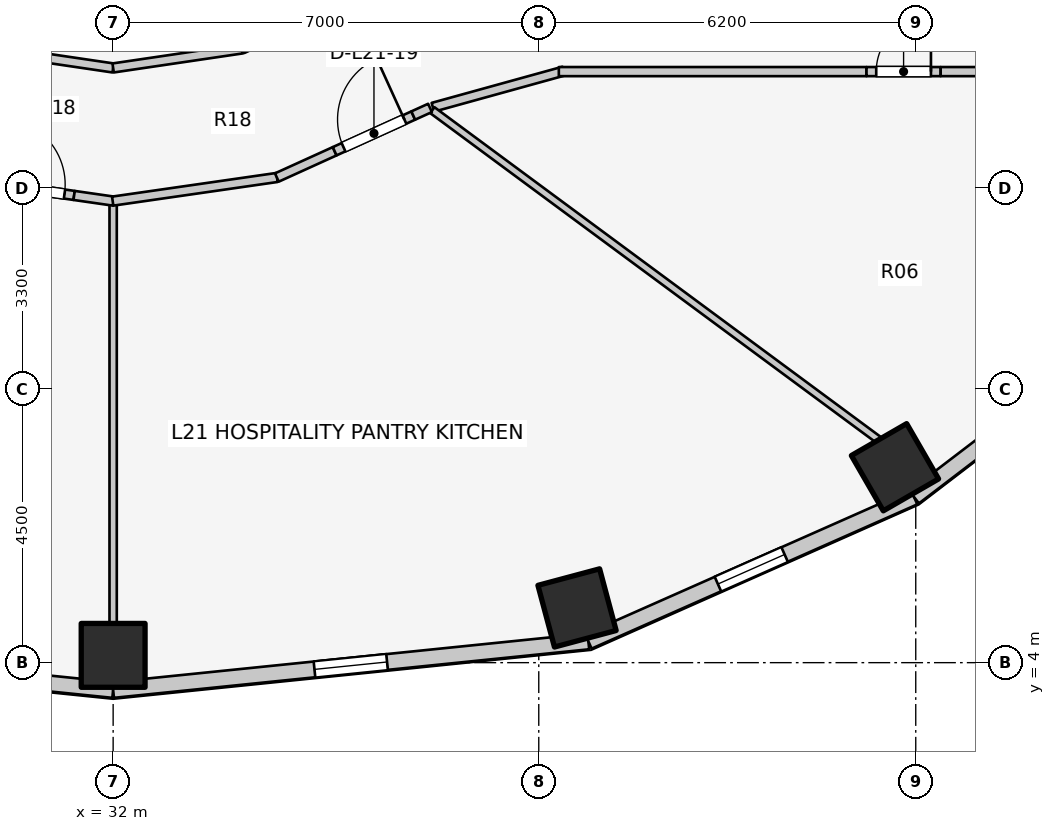
"""IFC4 building model, lengths in metres.
Left out: names, types, materials, properties, quantities, classifications, styles, units other than length and angle.
Written with IfcOpenShell. Run it as: python <this file> out.ifc"""

import sys

from ifc_helpers import new_model, si_unit, direction, frame, frame_2d, origin, origin_2d, place, context, subcontext, project, spatial, rectangle, extrude, element, fill, save


model = new_model("IFC4")
c1 = context("Model", 3, precision=1e-05, world=origin(), true_north=direction((0.0, 1.0)))
c2 = subcontext(c1, "Body", "Model", "MODEL_VIEW")
j1 = project(units=[si_unit("LENGTHUNIT", "METRE"), si_unit("PLANEANGLEUNIT", "RADIAN")], contexts=[c1])
p1 = place(None, origin())
s1 = spatial("IfcSite", under=j1, at=p1, CompositionType="ELEMENT")
p2 = place(p1, origin())
s2 = spatial("IfcBuilding", under=s1, at=p2, CompositionType="ELEMENT")
p3 = place(p2, frame((0.0, 0.0, 73.2)))
s3 = spatial("IfcBuildingStorey", under=s2, at=p3, CompositionType="ELEMENT", Elevation=73.2)
for number, where, z_axis, x_axis in (
    (1, (32.0, 4.12, 0.0), (0.0, 0.0, 1.0), (0.0, -1.0, 0.0)),
    (2, (39.629, 4.9, 0.0), (0.0, 0.0, 1.0), (0.259, -0.966, 0.0)),
    (3, (44.858, 7.214, 0.0), (0.0, 0.0, 1.0), (0.5, -0.866, 0.0)),
):
    element("IfcColumn", number, at=place(p3, frame(where, z_axis=z_axis, x_axis=x_axis)), inside=s3, PredefinedType="COLUMN", context=c2, shape_type="SweptSolid", body=[
        extrude(rectangle(XDim=1.05, YDim=1.05, at=origin_2d()), origin(), (0.0, 0.0, 1.0), 3.1),
    ])
p4 = place(p3, frame((24.184, 4.349, 0.0), z_axis=(0.0, 0.0, 1.0), x_axis=(0.994821390558, -0.101638579726, 0.0)))
e4 = element("IfcWall", 4, at=p4, inside=s3, PredefinedType="STANDARD", context=c2, shape_type="SweptSolid", body=[
    extrude(rectangle(XDim=7.857, YDim=0.26, at=frame_2d((3.929, 0.0))), origin(), (0.0, 0.0, 1.0), 1.22),
])
p5 = place(p4, frame((3.329, 0.0, 0.15)))
e5 = element("IfcOpeningElement", 5, at=p5, cuts=e4, PredefinedType="OPENING", context=c2, shape_type="SweptSolid", body=[
    extrude(rectangle(XDim=1.2, YDim=0.9, at=frame_2d((0.6, 0.45))), frame((0.0, 0.14, 0.0), z_axis=(0.0, -1.0, 0.0), x_axis=(1.0, 0.0, 0.0)), (0.0, 0.0, 1.0), 0.28),
])
p6 = place(p3, frame((32.0, 3.551, 0.0), z_axis=(0.0, 0.0, 1.0), x_axis=(0.994821390558, 0.101638579726, 0.0)))
e6 = element("IfcWall", 6, at=p6, inside=s3, PredefinedType="STANDARD", context=c2, shape_type="SweptSolid", body=[
    extrude(rectangle(XDim=7.857, YDim=0.26, at=frame_2d((3.929, 0.0))), origin(), (0.0, 0.0, 1.0), 1.22),
])
p7 = place(p6, frame((3.329, 0.0, 0.15)))
e7 = element("IfcOpeningElement", 7, at=p7, cuts=e6, PredefinedType="OPENING", context=c2, shape_type="SweptSolid", body=[
    extrude(rectangle(XDim=1.2, YDim=0.9, at=frame_2d((0.6, 0.45))), frame((0.0, 0.14, 0.0), z_axis=(0.0, -1.0, 0.0), x_axis=(1.0, 0.0, 0.0)), (0.0, 0.0, 1.0), 0.28),
])
p8 = place(p3, frame((39.816, 4.349, 0.0), z_axis=(0.0, 0.0, 1.0), x_axis=(0.914336605747, 0.404955023911, 0.0)))
e8 = element("IfcWall", 8, at=p8, inside=s3, PredefinedType="STANDARD", context=c2, shape_type="SweptSolid", body=[
    extrude(rectangle(XDim=5.859, YDim=0.26, at=frame_2d((2.929, 0.0))), origin(), (0.0, 0.0, 1.0), 1.22),
])
p9 = place(p8, frame((2.329, 0.0, 0.15)))
e9 = element("IfcOpeningElement", 9, at=p9, cuts=e8, PredefinedType="OPENING", context=c2, shape_type="SweptSolid", body=[
    extrude(rectangle(XDim=1.2, YDim=0.9, at=frame_2d((0.6, 0.45))), frame((0.0, 0.14, 0.0), z_axis=(0.0, -1.0, 0.0), x_axis=(1.0, 0.0, 0.0)), (0.0, 0.0, 1.0), 0.28),
])
p10 = place(p3, frame((45.173, 6.722, 0.0), z_axis=(0.0, 0.0, 1.0), x_axis=(0.794809810864, 0.606858603427, 0.0)))
e10 = element("IfcWall", 10, at=p10, inside=s3, PredefinedType="STANDARD", context=c2, shape_type="SweptSolid", body=[
    extrude(rectangle(XDim=5.149, YDim=0.26, at=frame_2d((2.575, 0.0))), origin(), (0.0, 0.0, 1.0), 1.22),
])
for number, where, z_axis, x_axis in (
    (11, (29.873, 14.094, 0.0), (0.0, 0.0, 1.0), (0.989, -0.146, 0.0)),
    (12, (32.0, 13.78, 0.0), (0.0, 0.0, 1.0), (0.989, 0.146, 0.0)),
):
    element("IfcWall", number, at=place(p3, frame(where, z_axis=z_axis, x_axis=x_axis)), inside=s3, PredefinedType="PARTITIONING", context=c2, shape_type="SweptSolid", body=[
        extrude(rectangle(XDim=2.151, YDim=0.15, at=frame_2d((1.075, 0.0))), origin(), (0.0, 0.0, 1.0), 1.22),
    ])
p11 = place(p3, frame((34.127, 14.094, 0.0), z_axis=(0.0, 0.0, 1.0), x_axis=(0.906943449489, 0.421252393975, 0.0)))
e13 = element("IfcWall", 13, at=p11, inside=s3, PredefinedType="PARTITIONING", context=c2, shape_type="SweptSolid", body=[
    extrude(rectangle(XDim=2.186, YDim=0.15, at=frame_2d((1.093, 0.0))), origin(), (0.0, 0.0, 1.0), 1.22),
])
p12 = place(p3, frame((37.258, 13.133, 0.0), z_axis=(0.0, 0.0, 1.0), x_axis=(0.963833843713, 0.266503886865, 0.0)))
e14 = element("IfcWall", 14, at=p12, inside=s3, PredefinedType="PARTITIONING", context=c2, shape_type="SweptSolid", body=[
    extrude(rectangle(XDim=2.232, YDim=0.15, at=frame_2d((1.116, 0.0))), origin(), (0.0, 0.0, 1.0), 1.22),
])
p13 = place(p3, frame((39.33, 13.72, 0.0), z_axis=(0.0, 0.0, 1.0), x_axis=(1.0, 0.0, 0.0)))
e15 = element("IfcWall", 15, at=p13, inside=s3, PredefinedType="PARTITIONING", context=c2, shape_type="SweptSolid", body=[
    extrude(rectangle(XDim=5.06, YDim=0.15, at=frame_2d((2.53, 0.0))), origin(), (0.0, 0.0, 1.0), 1.22),
])
p14 = place(p3, frame((44.39, 13.72, 0.0), z_axis=(0.0, 0.0, 1.0), x_axis=(1.0, 0.0, 0.0)))
e16 = element("IfcWall", 16, at=p14, inside=s3, PredefinedType="PARTITIONING", context=c2, shape_type="SweptSolid", body=[
    extrude(rectangle(XDim=1.22, YDim=0.15, at=frame_2d((0.61, 0.0))), origin(), (0.0, 0.0, 1.0), 2.575),
])
p15 = place(p14, frame((0.16, 0.0, 0.0)))
e17 = element("IfcOpeningElement", 17, at=p15, cuts=e16, PredefinedType="OPENING", context=c2, shape_type="SweptSolid", body=[
    extrude(rectangle(XDim=0.9, YDim=2.1, at=frame_2d((0.45, 1.05))), frame((0.0, 0.085, 0.0), z_axis=(0.0, -1.0, 0.0), x_axis=(1.0, 0.0, 0.0)), (0.0, 0.0, 1.0), 0.17),
])
p16 = place(p3, frame((45.61, 13.72, 0.0), z_axis=(0.0, 0.0, 1.0), x_axis=(1.0, 0.0, 0.0)))
e18 = element("IfcWall", 18, at=p16, inside=s3, PredefinedType="PARTITIONING", context=c2, shape_type="SweptSolid", body=[
    extrude(rectangle(XDim=1.24, YDim=0.15, at=frame_2d((0.62, 0.0))), origin(), (0.0, 0.0, 1.0), 2.575),
])
p17 = place(p3, frame((32.0, 11.535, 0.0), z_axis=(0.0, 0.0, 1.0), x_axis=(0.0, -1.0, 0.0)))
e19 = element("IfcWall", 19, at=p17, inside=s3, PredefinedType="MOVABLE", context=c2, shape_type="SweptSolid", body=[
    extrude(rectangle(XDim=6.91, YDim=0.12, at=frame_2d((3.455, 0.0))), origin(), (0.0, 0.0, 1.0), 1.22),
])
p18 = place(p3, frame((37.249, 13.086, 0.0), z_axis=(0.0, 0.0, 1.0), x_axis=(0.80430981394, -0.594210167533, 0.0)))
e20 = element("IfcWall", 20, at=p18, inside=s3, PredefinedType="MOVABLE", context=c2, shape_type="SweptSolid", body=[
    extrude(rectangle(XDim=9.146, YDim=0.12, at=frame_2d((4.573, 0.0))), origin(), (0.0, 0.0, 1.0), 1.22),
])
p19 = place(p3, frame((29.953, 11.886, 0.0), z_axis=(0.0, 0.0, 1.0), x_axis=(0.98979070052, -0.142528485449, 0.0)))
e21 = element("IfcWall", 21, at=p19, inside=s3, PredefinedType="PARTITIONING", context=c2, shape_type="SweptSolid", body=[
    extrude(rectangle(XDim=1.42, YDim=0.15, at=frame_2d((0.71, 0.0))), origin(), (0.0, 0.0, 1.0), 2.575),
])
p20 = place(p19, frame((0.16, 0.0, 0.0)))
e22 = element("IfcOpeningElement", 22, at=p20, cuts=e21, PredefinedType="OPENING", context=c2, shape_type="SweptSolid", body=[
    extrude(rectangle(XDim=1.1, YDim=2.1, at=frame_2d((0.55, 1.05))), frame((0.0, 0.085, 0.0), z_axis=(0.0, -1.0, 0.0), x_axis=(1.0, 0.0, 0.0)), (0.0, 0.0, 1.0), 0.17),
])
p21 = place(p3, frame((31.358, 11.684, 0.0), z_axis=(0.0, 0.0, 1.0), x_axis=(0.989777474181, -0.142620305723, 0.0)))
e23 = element("IfcWall", 23, at=p21, inside=s3, PredefinedType="PARTITIONING", context=c2, shape_type="SweptSolid", body=[
    extrude(rectangle(XDim=0.656, YDim=0.15, at=frame_2d((0.328, 0.0))), origin(), (0.0, 0.0, 1.0), 1.22),
])
p22 = place(p3, frame((31.993, 11.59, 0.0), z_axis=(0.0, 0.0, 1.0), x_axis=(0.989796962007, 0.142484995705, 0.0)))
e24 = element("IfcWall", 24, at=p22, inside=s3, PredefinedType="PARTITIONING", context=c2, shape_type="SweptSolid", body=[
    extrude(rectangle(XDim=2.731, YDim=0.15, at=frame_2d((1.366, 0.0))), origin(), (0.0, 0.0, 1.0), 1.22),
])
p23 = place(p3, frame((34.693, 11.978, 0.0), z_axis=(0.0, 0.0, 1.0), x_axis=(0.910454535794, 0.413609161228, 0.0)))
e25 = element("IfcWall", 25, at=p23, inside=s3, PredefinedType="PARTITIONING", context=c2, shape_type="SweptSolid", body=[
    extrude(rectangle(XDim=1.044, YDim=0.15, at=frame_2d((0.522, 0.0))), origin(), (0.0, 0.0, 1.0), 1.22),
])
p24 = place(p3, frame((35.643, 12.41, 0.0), z_axis=(0.0, 0.0, 1.0), x_axis=(0.910419465037, 0.413686351819, 0.0)))
e26 = element("IfcWall", 26, at=p24, inside=s3, PredefinedType="PARTITIONING", context=c2, shape_type="SweptSolid", body=[
    extrude(rectangle(XDim=1.42, YDim=0.15, at=frame_2d((0.71, 0.0))), origin(), (0.0, 0.0, 1.0), 2.16),
])
p25 = place(p24, frame((0.16, 0.0, 0.0)))
e27 = element("IfcOpeningElement", 27, at=p25, cuts=e26, PredefinedType="OPENING", context=c2, shape_type="SweptSolid", body=[
    extrude(rectangle(XDim=1.1, YDim=2.1, at=frame_2d((0.55, 1.05))), frame((0.0, 0.085, 0.0), z_axis=(0.0, -1.0, 0.0), x_axis=(1.0, 0.0, 0.0)), (0.0, 0.0, 1.0), 0.17),
])
p26 = place(p3, frame((36.936, 12.998, 0.0), z_axis=(0.0, 0.0, 1.0), x_axis=(0.910449457667, 0.413620339242, 0.0)))
e28 = element("IfcWall", 28, at=p26, inside=s3, PredefinedType="PARTITIONING", context=c2, shape_type="SweptSolid", body=[
    extrude(rectangle(XDim=0.302, YDim=0.15, at=frame_2d((0.151, 0.0))), origin(), (0.0, 0.0, 1.0), 2.575),
])
p27 = place(p7, origin())
e29 = element("IfcWindow", 29, at=p27, inside=s3, PartitioningType="SINGLE_PANEL", PredefinedType="WINDOW", context=c2, shape_type="SweptSolid", body=[
    extrude(rectangle(XDim=1.2, YDim=0.9, at=frame_2d((0.6, 0.45))), frame((0.0, 0.03, 0.0), z_axis=(0.0, -1.0, 0.0), x_axis=(1.0, 0.0, 0.0)), (0.0, 0.0, 1.0), 0.06),
])
fill(e7, e29)
p28 = place(p9, origin())
e30 = element("IfcWindow", 30, at=p28, inside=s3, PartitioningType="SINGLE_PANEL", PredefinedType="WINDOW", context=c2, shape_type="SweptSolid", body=[
    extrude(rectangle(XDim=1.2, YDim=0.9, at=frame_2d((0.6, 0.45))), frame((0.0, 0.03, 0.0), z_axis=(0.0, -1.0, 0.0), x_axis=(1.0, 0.0, 0.0)), (0.0, 0.0, 1.0), 0.06),
])
fill(e9, e30)
p29 = place(p15, origin())
e31 = element("IfcDoor", 31, at=p29, inside=s3, OperationType="SINGLE_SWING_RIGHT", PredefinedType="DOOR", context=c2, shape_type="SweptSolid", body=[
    extrude(rectangle(XDim=0.9, YDim=2.1, at=frame_2d((0.45, 1.05))), frame((0.0, 0.025, 0.0), z_axis=(0.0, -1.0, 0.0), x_axis=(1.0, 0.0, 0.0)), (0.0, 0.0, 1.0), 0.05),
])
fill(e17, e31)
p30 = place(p20, origin())
e32 = element("IfcDoor", 32, at=p30, inside=s3, OperationType="SINGLE_SWING_LEFT", PredefinedType="DOOR", context=c2, shape_type="SweptSolid", body=[
    extrude(rectangle(XDim=1.1, YDim=2.1, at=frame_2d((0.55, 1.05))), frame((0.0, 0.025, 0.0), z_axis=(0.0, -1.0, 0.0), x_axis=(1.0, 0.0, 0.0)), (0.0, 0.0, 1.0), 0.05),
])
fill(e22, e32)
p31 = place(p25, origin())
e33 = element("IfcDoor", 33, at=p31, inside=s3, OperationType="SINGLE_SWING_RIGHT", PredefinedType="DOOR", context=c2, shape_type="SweptSolid", body=[
    extrude(rectangle(XDim=1.1, YDim=2.1, at=frame_2d((0.55, 1.05))), frame((0.0, 0.025, 0.0), z_axis=(0.0, -1.0, 0.0), x_axis=(1.0, 0.0, 0.0)), (0.0, 0.0, 1.0), 0.05),
])
fill(e27, e33)
save(model, sys.argv[1])
